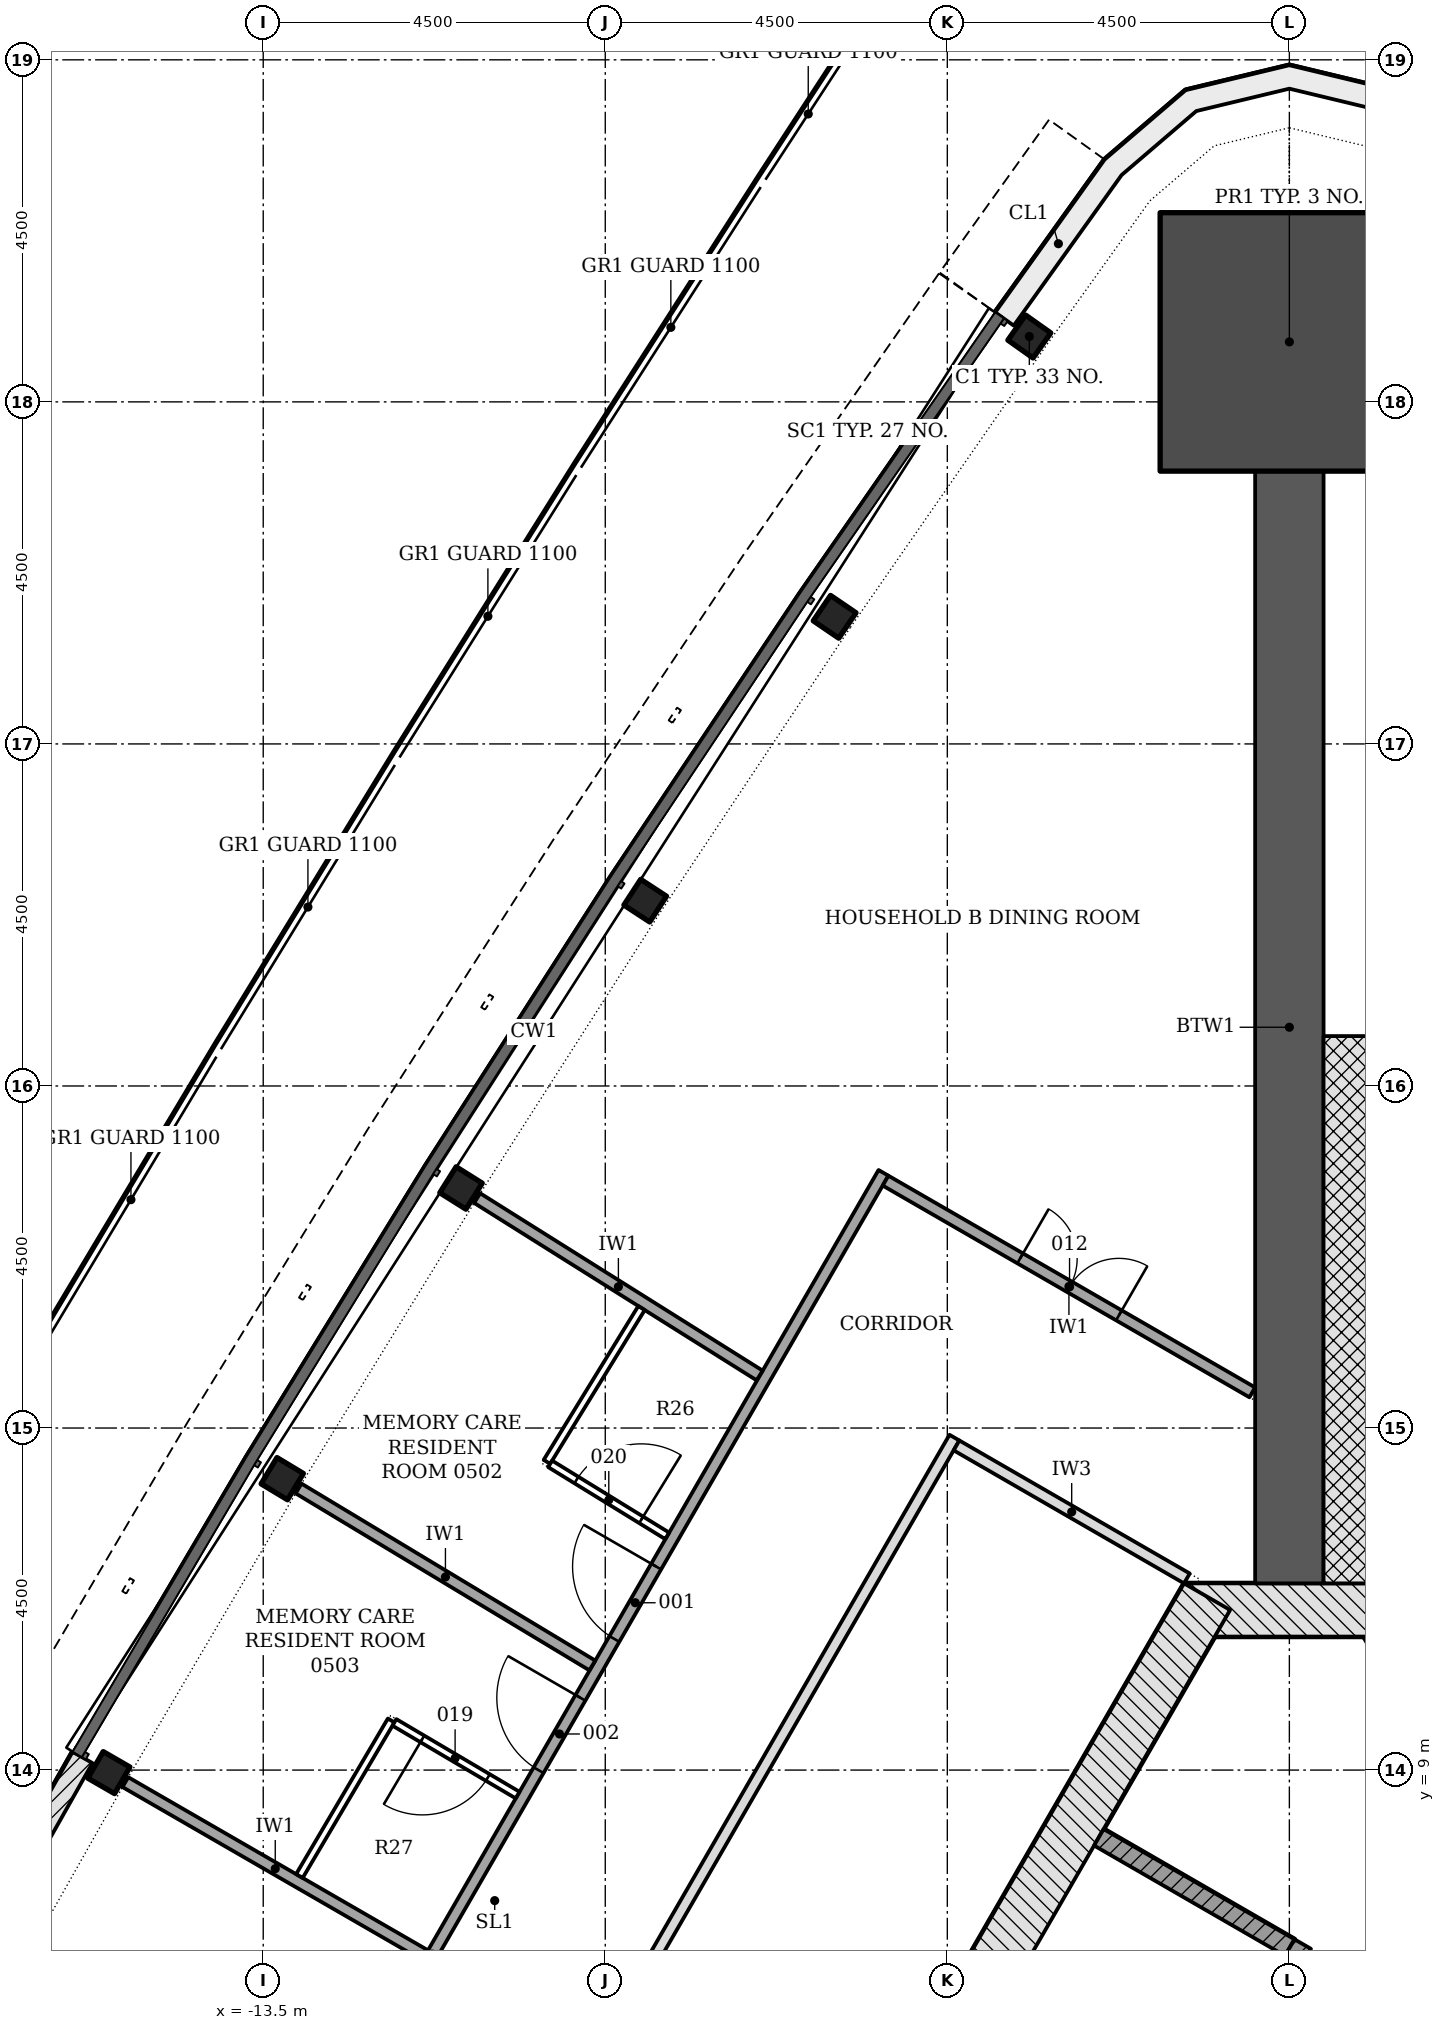
"""IFC4 building model, lengths in metres.
Left out: names, types, materials, properties, quantities, classifications, styles, units other than length and angle.
Written with IfcOpenShell. Run it as: python <this file> out.ifc"""

import sys

from ifc_helpers import new_model, si_unit, direction, frame, frame_2d, origin, origin_2d, place, context, subcontext, project, spatial, polyline, rectangle, i_section, outline, extrude, element, fill, save


model = new_model("IFC4")
c1 = context("Model", 3, precision=1e-05, world=origin(), true_north=direction((0.0, 1.0)))
c2 = subcontext(c1, "Body", "Model", "MODEL_VIEW")
j1 = project(units=[si_unit("LENGTHUNIT", "METRE"), si_unit("PLANEANGLEUNIT", "RADIAN")], contexts=[c1])
p1 = place(None, origin())
s1 = spatial("IfcSite", under=j1, at=p1, CompositionType="ELEMENT")
p2 = place(p1, origin())
s2 = spatial("IfcBuilding", under=s1, at=p2, CompositionType="ELEMENT")
p3 = place(p2, frame((0.0, 0.0, 24.0)))
s3 = spatial("IfcBuildingStorey", under=s2, at=p3, CompositionType="ELEMENT", Elevation=24.0)
p4 = place(p3, frame((10.311, -4.703, -0.2), z_axis=(0.0, 0.0, 1.0), x_axis=(-0.500001446645, 0.866024568562, 0.0)))
e1 = element("IfcWall", 1, at=p4, inside=s3, PredefinedType="SHEAR", context=c2, shape_type="SweptSolid", body=[
    extrude(rectangle(XDim=18.458, YDim=0.7, at=frame_2d((9.229, 0.0))), origin(), (0.0, 0.0, 1.0), 3.6),
])
p5 = place(p4, frame((8.7, 0.0, 0.2)))
e2 = element("IfcOpeningElement", 2, at=p5, cuts=e1, PredefinedType="OPENING", context=c2, shape_type="SweptSolid", body=[
    extrude(rectangle(XDim=1.0, YDim=2.1, at=frame_2d((0.5, 1.05))), frame((0.0, 0.36, 0.0), z_axis=(0.0, -1.0, 0.0), x_axis=(1.0, 0.0, 0.0)), (0.0, 0.0, 1.0), 0.72),
])
p6 = place(p4, frame((3.99, 0.0, 0.2)))
e3 = element("IfcOpeningElement", 3, at=p6, cuts=e1, PredefinedType="OPENING", context=c2, shape_type="SweptSolid", body=[
    extrude(rectangle(XDim=0.9, YDim=2.1, at=frame_2d((0.45, 1.05))), frame((0.0, 0.36, 0.0), z_axis=(0.0, -1.0, 0.0), x_axis=(1.0, 0.0, 0.0)), (0.0, 0.0, 1.0), 0.72),
])
p7 = place(p4, frame((13.539, 0.0, 0.2)))
e4 = element("IfcOpeningElement", 4, at=p7, cuts=e1, PredefinedType="OPENING", context=c2, shape_type="SweptSolid", body=[
    extrude(rectangle(XDim=0.9, YDim=2.1, at=frame_2d((0.45, 1.05))), frame((0.0, 0.36, 0.0), z_axis=(0.0, -1.0, 0.0), x_axis=(1.0, 0.0, 0.0)), (0.0, 0.0, 1.0), 0.72),
])
p8 = place(p3, frame((1.386, 11.106, -0.2), z_axis=(0.0, 0.0, 1.0), x_axis=(-1.0, 0.0, 0.0)))
e5 = element("IfcWall", 5, at=p8, inside=s3, PredefinedType="SHEAR", context=c2, shape_type="SweptSolid", body=[
    extrude(rectangle(XDim=2.771, YDim=0.7, at=frame_2d((1.386, 0.0))), origin(), (0.0, 0.0, 1.0), 3.6),
])
p9 = place(p3, frame((-1.083, 11.281, -0.2), z_axis=(0.0, 0.0, 1.0), x_axis=(-0.500001446645, -0.866024568562, 0.0)))
e6 = element("IfcWall", 6, at=p9, inside=s3, PredefinedType="SHEAR", context=c2, shape_type="SweptSolid", body=[
    extrude(rectangle(XDim=18.458, YDim=0.7, at=frame_2d((9.229, 0.0))), origin(), (0.0, 0.0, 1.0), 3.6),
])
p10 = place(p9, frame((8.979, 0.0, 0.2)))
e7 = element("IfcOpeningElement", 7, at=p10, cuts=e6, PredefinedType="OPENING", context=c2, shape_type="SweptSolid", body=[
    extrude(rectangle(XDim=1.2, YDim=2.1, at=frame_2d((0.6, 1.05))), frame((0.0, 0.36, 0.0), z_axis=(0.0, -1.0, 0.0), x_axis=(1.0, 0.0, 0.0)), (0.0, 0.0, 1.0), 0.72),
])
p11 = place(p9, frame((11.029, 0.0, 0.2)))
e8 = element("IfcOpeningElement", 8, at=p11, cuts=e6, PredefinedType="OPENING", context=c2, shape_type="SweptSolid", body=[
    extrude(rectangle(XDim=1.2, YDim=2.1, at=frame_2d((0.6, 1.05))), frame((0.0, 0.36, 0.0), z_axis=(0.0, -1.0, 0.0), x_axis=(1.0, 0.0, 0.0)), (0.0, 0.0, 1.0), 0.72),
])
p12 = place(p3, frame((0.0, 11.456, -0.2), z_axis=(0.0, 0.0, 1.0), x_axis=(0.0, 1.0, 0.0)))
e9 = element("IfcWall", 9, at=p12, inside=s3, PredefinedType="SHEAR", context=c2, shape_type="SweptSolid", body=[
    extrude(rectangle(XDim=14.633, YDim=0.9, at=frame_2d((7.316, 0.0))), origin(), (0.0, 0.0, 1.0), 3.6),
])
p13 = place(p3, frame((0.0, 27.789, -0.2), z_axis=(0.0, 0.0, 1.0), x_axis=(0.0, 1.0, 0.0)))
e10 = element("IfcColumn", 10, at=p13, inside=s3, PredefinedType="COLUMN", context=c2, shape_type="SweptSolid", body=[
    extrude(rectangle(XDim=3.4, YDim=3.4, at=origin_2d()), origin(), (0.0, 0.0, 1.0), 3.6),
])
for number, where, z_axis, x_axis in (
    (11, (-3.421, 27.86, -0.2), (0.0, 0.0, 1.0), (-0.578, -0.816, 0.0)),
    (12, (-5.982, 24.172, -0.2), (0.0, 0.0, 1.0), (-0.563, -0.827, 0.0)),
    (13, (-8.475, 20.438, -0.2), (0.0, 0.0, 1.0), (-0.547, -0.837, 0.0)),
    (14, (-10.897, 16.658, -0.2), (0.0, 0.0, 1.0), (-0.532, -0.847, 0.0)),
    (15, (-13.25, 12.834, -0.2), (0.0, 0.0, 1.0), (-0.516, -0.857, 0.0)),
    (16, (-15.531, 8.967, -0.2), (0.0, 0.0, 1.0), (-0.5, -0.866, 0.0)),
):
    element("IfcColumn", number, at=place(p3, frame(where, z_axis=z_axis, x_axis=x_axis)), inside=s3, PredefinedType="COLUMN", context=c2, shape_type="SweptSolid", body=[
        extrude(i_section(OverallWidth=0.404, OverallDepth=0.406, WebThickness=0.027, FlangeThickness=0.044, FilletRadius=0.015, at=origin_2d()), origin(), (0.0, 0.0, 1.0), 3.6),
    ])
p14 = place(p3, frame((-18.089, 5.252, 0.0), z_axis=(0.0, 0.0, 1.0), x_axis=(0.491969578613, 0.870612390056, 0.0)))
e17 = element("IfcWall", 17, at=p14, inside=s3, PredefinedType="NOTDEFINED", context=c2, shape_type="SweptSolid", body=[
    extrude(rectangle(XDim=4.496, YDim=0.3, at=frame_2d((2.248, 0.0))), origin(), (0.0, 0.0, 1.0), 3.3),
])
p15 = place(p14, frame((1.648, 0.0, 0.0)))
e18 = element("IfcOpeningElement", 18, at=p15, cuts=e17, PredefinedType="OPENING", context=c2, shape_type="SweptSolid", body=[
    extrude(rectangle(XDim=1.2, YDim=2.4, at=frame_2d((0.6, 1.2))), frame((0.0, 0.16, 0.0), z_axis=(0.0, -1.0, 0.0), x_axis=(1.0, 0.0, 0.0)), (0.0, 0.0, 1.0), 0.32),
])
p16 = place(p3, origin())
e19 = element("IfcWall", 19, at=p16, inside=s3, PredefinedType="NOTDEFINED", context=c2, shape_type="SweptSolid", body=[
    extrude(outline(polyline([(3.87, 28.178), (2.43, 30.188), (1.364, 31.101), (0.0, 31.429), (-1.364, 31.101), (-2.43, 30.188), (-3.87, 28.178), (-3.626, 28.003), (-2.208, 29.984), (-1.224, 30.826), (0.0, 31.121), (1.224, 30.826), (2.208, 29.984), (3.626, 28.003), (3.87, 28.178)])), origin(), (0.0, 0.0, 1.0), 3.3),
])
p17 = place(p3, frame((-2.506, 8.115, -0.2), z_axis=(0.0, 0.0, 1.0), x_axis=(0.865996321171, -0.50005036918, 0.0)))
e20 = element("IfcWall", 20, at=p17, inside=s3, PredefinedType="PARTITIONING", context=c2, shape_type="SweptSolid", body=[
    extrude(rectangle(XDim=2.9, YDim=0.25, at=frame_2d((1.45, 0.0))), origin(), (0.0, 0.0, 1.0), 3.6),
])
p18 = place(p3, frame((0.176, 6.711, 0.0), z_axis=(0.0, 0.0, 1.0), x_axis=(-0.500004227369, -0.866022963098, 0.0)))
e21 = element("IfcWall", 21, at=p18, inside=s3, PredefinedType="PARTITIONING", context=c2, shape_type="SweptSolid", body=[
    extrude(rectangle(XDim=11.8, YDim=0.25, at=frame_2d((5.9, 0.0))), origin(), (0.0, 0.0, 1.0), 3.4),
])
p19 = place(p3, frame((1.018, 11.456, -0.2), z_axis=(0.0, 0.0, 1.0), x_axis=(0.0, 1.0, 0.0)))
e22 = element("IfcWall", 22, at=p19, inside=s3, PredefinedType="SHEAR", context=c2, shape_type="SweptSolid", body=[
    extrude(rectangle(XDim=7.2, YDim=1.136, at=frame_2d((3.6, 0.0))), origin(), (0.0, 0.0, 1.0), 3.6),
])
p20 = place(p3, frame((-17.208, -3.699, 0.0), z_axis=(0.0, 0.0, 1.0), x_axis=(0.499997567621, 0.866026808115, 0.0)))
e23 = element("IfcWall", 23, at=p20, inside=s3, PredefinedType="PARTITIONING", context=c2, shape_type="SweptSolid", body=[
    extrude(rectangle(XDim=23.736, YDim=0.15, at=frame_2d((11.868, 0.0))), origin(), (0.0, 0.0, 1.0), 2.768),
])
p21 = place(p20, frame((16.656, 0.0, 0.0)))
e24 = element("IfcOpeningElement", 24, at=p21, cuts=e23, PredefinedType="OPENING", context=c2, shape_type="SweptSolid", body=[
    extrude(rectangle(XDim=1.1, YDim=2.1, at=frame_2d((0.55, 1.05))), frame((0.0, 0.085, 0.0), z_axis=(0.0, -1.0, 0.0), x_axis=(1.0, 0.0, 0.0)), (0.0, 0.0, 1.0), 0.17),
])
p22 = place(p20, frame((14.662, 0.0, 0.0)))
e25 = element("IfcOpeningElement", 25, at=p22, cuts=e23, PredefinedType="OPENING", context=c2, shape_type="SweptSolid", body=[
    extrude(rectangle(XDim=1.1, YDim=2.1, at=frame_2d((0.55, 1.05))), frame((0.0, 0.085, 0.0), z_axis=(0.0, -1.0, 0.0), x_axis=(1.0, 0.0, 0.0)), (0.0, 0.0, 1.0), 0.17),
])
p23 = place(p20, frame((5.273, 0.0, 0.0)))
e26 = element("IfcOpeningElement", 26, at=p23, cuts=e23, PredefinedType="OPENING", context=c2, shape_type="SweptSolid", body=[
    extrude(rectangle(XDim=1.0, YDim=2.1, at=frame_2d((0.5, 1.05))), frame((0.0, 0.085, 0.0), z_axis=(0.0, -1.0, 0.0), x_axis=(1.0, 0.0, 0.0)), (0.0, 0.0, 1.0), 0.17),
])
p24 = place(p3, frame((-4.407, 13.374, 0.0), z_axis=(0.0, 0.0, 1.0), x_axis=(-0.499997181693, -0.866027030928, 0.0)))
e27 = element("IfcWall", 27, at=p24, inside=s3, PredefinedType="PARTITIONING", context=c2, shape_type="SweptSolid", body=[
    extrude(rectangle(XDim=16.77, YDim=0.15, at=frame_2d((8.385, 0.0))), origin(), (0.0, 0.0, 1.0), 2.768),
])
p25 = place(p24, frame((8.879, 0.0, 0.0)))
e28 = element("IfcOpeningElement", 28, at=p25, cuts=e27, PredefinedType="OPENING", context=c2, shape_type="SweptSolid", body=[
    extrude(rectangle(XDim=1.0, YDim=2.1, at=frame_2d((0.5, 1.05))), frame((0.0, 0.085, 0.0), z_axis=(0.0, -1.0, 0.0), x_axis=(1.0, 0.0, 0.0)), (0.0, 0.0, 1.0), 0.17),
])
p26 = place(p3, frame((-5.312, 16.755, 0.0), z_axis=(0.0, 0.0, 1.0), x_axis=(0.866028693448, -0.499994302092, 0.0)))
e29 = element("IfcWall", 29, at=p26, inside=s3, PredefinedType="PARTITIONING", context=c2, shape_type="SweptSolid", body=[
    extrude(rectangle(XDim=5.571, YDim=0.15, at=frame_2d((2.786, 0.0))), origin(), (0.0, 0.0, 1.0), 3.4),
])
p27 = place(p26, frame((2.045, 0.0, 0.0)))
e30 = element("IfcOpeningElement", 30, at=p27, cuts=e29, PredefinedType="OPENING", context=c2, shape_type="SweptSolid", body=[
    extrude(rectangle(XDim=1.5, YDim=2.1, at=frame_2d((0.75, 1.05))), frame((0.0, 0.085, 0.0), z_axis=(0.0, -1.0, 0.0), x_axis=(1.0, 0.0, 0.0)), (0.0, 0.0, 1.0), 0.17),
])
p28 = place(p3, frame((-4.379, 13.271, 0.0), z_axis=(0.0, 0.0, 1.0), x_axis=(0.866019471182, -0.500010275428, 0.0)))
e31 = element("IfcWall", 31, at=p28, inside=s3, PredefinedType="PARTITIONING", context=c2, shape_type="SweptSolid", body=[
    extrude(rectangle(XDim=3.5, YDim=0.15, at=frame_2d((1.75, 0.0))), origin(), (0.0, 0.0, 1.0), 3.4),
])
p29 = place(p3, frame((-15.314, 8.842, 0.0), z_axis=(0.0, 0.0, 1.0), x_axis=(0.866031166731, -0.499990018151, 0.0)))
e32 = element("IfcWall", 32, at=p29, inside=s3, PredefinedType="PARTITIONING", context=c2, shape_type="SweptSolid", body=[
    extrude(rectangle(XDim=4.555, YDim=0.15, at=frame_2d((2.277, 0.0))), origin(), (0.0, 0.0, 1.0), 2.768),
])
p30 = place(p3, frame((-13.036, 12.705, 0.0), z_axis=(0.0, 0.0, 1.0), x_axis=(0.856594224171, -0.515990634719, 0.0)))
e33 = element("IfcWall", 33, at=p30, inside=s3, PredefinedType="PARTITIONING", context=c2, shape_type="SweptSolid", body=[
    extrude(rectangle(XDim=4.513, YDim=0.15, at=frame_2d((2.256, 0.0))), origin(), (0.0, 0.0, 1.0), 2.768),
])
p31 = place(p3, frame((-10.686, 16.525, 0.0), z_axis=(0.0, 0.0, 1.0), x_axis=(0.846871345174, -0.531797823165, 0.0)))
e34 = element("IfcWall", 34, at=p31, inside=s3, PredefinedType="PARTITIONING", context=c2, shape_type="SweptSolid", body=[
    extrude(rectangle(XDim=4.389, YDim=0.15, at=frame_2d((2.194, 0.0))), origin(), (0.0, 0.0, 1.0), 2.768),
])
for number, where, z_axis, x_axis in (
    (35, (-8.523, 15.078, 0.0), (0.0, 0.0, 1.0), (-0.524, -0.852, 0.0)),
    (36, (-13.024, 7.606, 0.0), (0.0, 0.0, 1.0), (0.508, 0.861, 0.0)),
):
    element("IfcWall", number, at=place(p3, frame(where, z_axis=z_axis, x_axis=x_axis)), inside=s3, PredefinedType="PARTITIONING", context=c2, shape_type="SweptSolid", body=[
        extrude(rectangle(XDim=2.375, YDim=0.1, at=frame_2d((1.188, 0.0))), origin(), (0.0, 0.0, 1.0), 2.768),
    ])
p32 = place(p3, frame((-10.153, 8.671, 0.0), z_axis=(0.0, 0.0, 1.0), x_axis=(-0.861326599867, 0.508051659147, 0.0)))
e37 = element("IfcWall", 37, at=p32, inside=s3, PredefinedType="PARTITIONING", context=c2, shape_type="SweptSolid", body=[
    extrude(rectangle(XDim=1.882, YDim=0.1, at=frame_2d((0.941, 0.0))), origin(), (0.0, 0.0, 1.0), 3.4),
])
p33 = place(p32, frame((0.455, 0.0, 0.0)))
e38 = element("IfcOpeningElement", 38, at=p33, cuts=e37, PredefinedType="OPENING", context=c2, shape_type="SweptSolid", body=[
    extrude(rectangle(XDim=1.0, YDim=2.1, at=frame_2d((0.5, 1.05))), frame((0.0, 0.06, 0.0), z_axis=(0.0, -1.0, 0.0), x_axis=(1.0, 0.0, 0.0)), (0.0, 0.0, 1.0), 0.12),
])
p34 = place(p3, frame((-9.725, 13.029, 0.0), z_axis=(0.0, 0.0, 1.0), x_axis=(0.851755692017, -0.523939157839, 0.0)))
e39 = element("IfcWall", 39, at=p34, inside=s3, PredefinedType="PARTITIONING", context=c2, shape_type="SweptSolid", body=[
    extrude(rectangle(XDim=1.808, YDim=0.1, at=frame_2d((0.904, 0.0))), origin(), (0.0, 0.0, 1.0), 3.4),
])
p35 = place(p34, frame((0.406, 0.0, 0.0)))
e40 = element("IfcOpeningElement", 40, at=p35, cuts=e39, PredefinedType="OPENING", context=c2, shape_type="SweptSolid", body=[
    extrude(rectangle(XDim=1.0, YDim=2.1, at=frame_2d((0.5, 1.05))), frame((0.0, 0.06, 0.0), z_axis=(0.0, -1.0, 0.0), x_axis=(1.0, 0.0, 0.0)), (0.0, 0.0, 1.0), 0.12),
])
p36 = place(p21, origin())
e41 = element("IfcDoor", 41, at=p36, inside=s3, OperationType="SINGLE_SWING_RIGHT", PredefinedType="DOOR", context=c2, shape_type="SweptSolid", body=[
    extrude(rectangle(XDim=1.1, YDim=2.1, at=frame_2d((0.55, 1.05))), frame((0.0, 0.025, 0.0), z_axis=(0.0, -1.0, 0.0), x_axis=(1.0, 0.0, 0.0)), (0.0, 0.0, 1.0), 0.05),
])
fill(e24, e41)
p37 = place(p22, origin())
e42 = element("IfcDoor", 42, at=p37, inside=s3, OperationType="SINGLE_SWING_RIGHT", PredefinedType="DOOR", context=c2, shape_type="SweptSolid", body=[
    extrude(rectangle(XDim=1.1, YDim=2.1, at=frame_2d((0.55, 1.05))), frame((0.0, 0.025, 0.0), z_axis=(0.0, -1.0, 0.0), x_axis=(1.0, 0.0, 0.0)), (0.0, 0.0, 1.0), 0.05),
])
fill(e25, e42)
p38 = place(p27, origin())
e43 = element("IfcDoor", 43, at=p38, inside=s3, OperationType="DOUBLE_DOOR_SINGLE_SWING", PredefinedType="DOOR", context=c2, shape_type="SweptSolid", body=[
    extrude(rectangle(XDim=1.5, YDim=2.1, at=frame_2d((0.75, 1.05))), frame((0.0, 0.025, 0.0), z_axis=(0.0, -1.0, 0.0), x_axis=(1.0, 0.0, 0.0)), (0.0, 0.0, 1.0), 0.05),
])
fill(e30, e43)
p39 = place(p33, origin())
e44 = element("IfcDoor", 44, at=p39, inside=s3, OperationType="SINGLE_SWING_RIGHT", PredefinedType="DOOR", context=c2, shape_type="SweptSolid", body=[
    extrude(rectangle(XDim=1.0, YDim=2.1, at=frame_2d((0.5, 1.05))), frame((0.0, 0.025, 0.0), z_axis=(0.0, -1.0, 0.0), x_axis=(1.0, 0.0, 0.0)), (0.0, 0.0, 1.0), 0.05),
])
fill(e38, e44)
p40 = place(p35, origin())
e45 = element("IfcDoor", 45, at=p40, inside=s3, OperationType="SINGLE_SWING_RIGHT", PredefinedType="DOOR", context=c2, shape_type="SweptSolid", body=[
    extrude(rectangle(XDim=1.0, YDim=2.1, at=frame_2d((0.5, 1.05))), frame((0.0, 0.025, 0.0), z_axis=(0.0, -1.0, 0.0), x_axis=(1.0, 0.0, 0.0)), (0.0, 0.0, 1.0), 0.05),
])
fill(e40, e45)
save(model, sys.argv[1])
